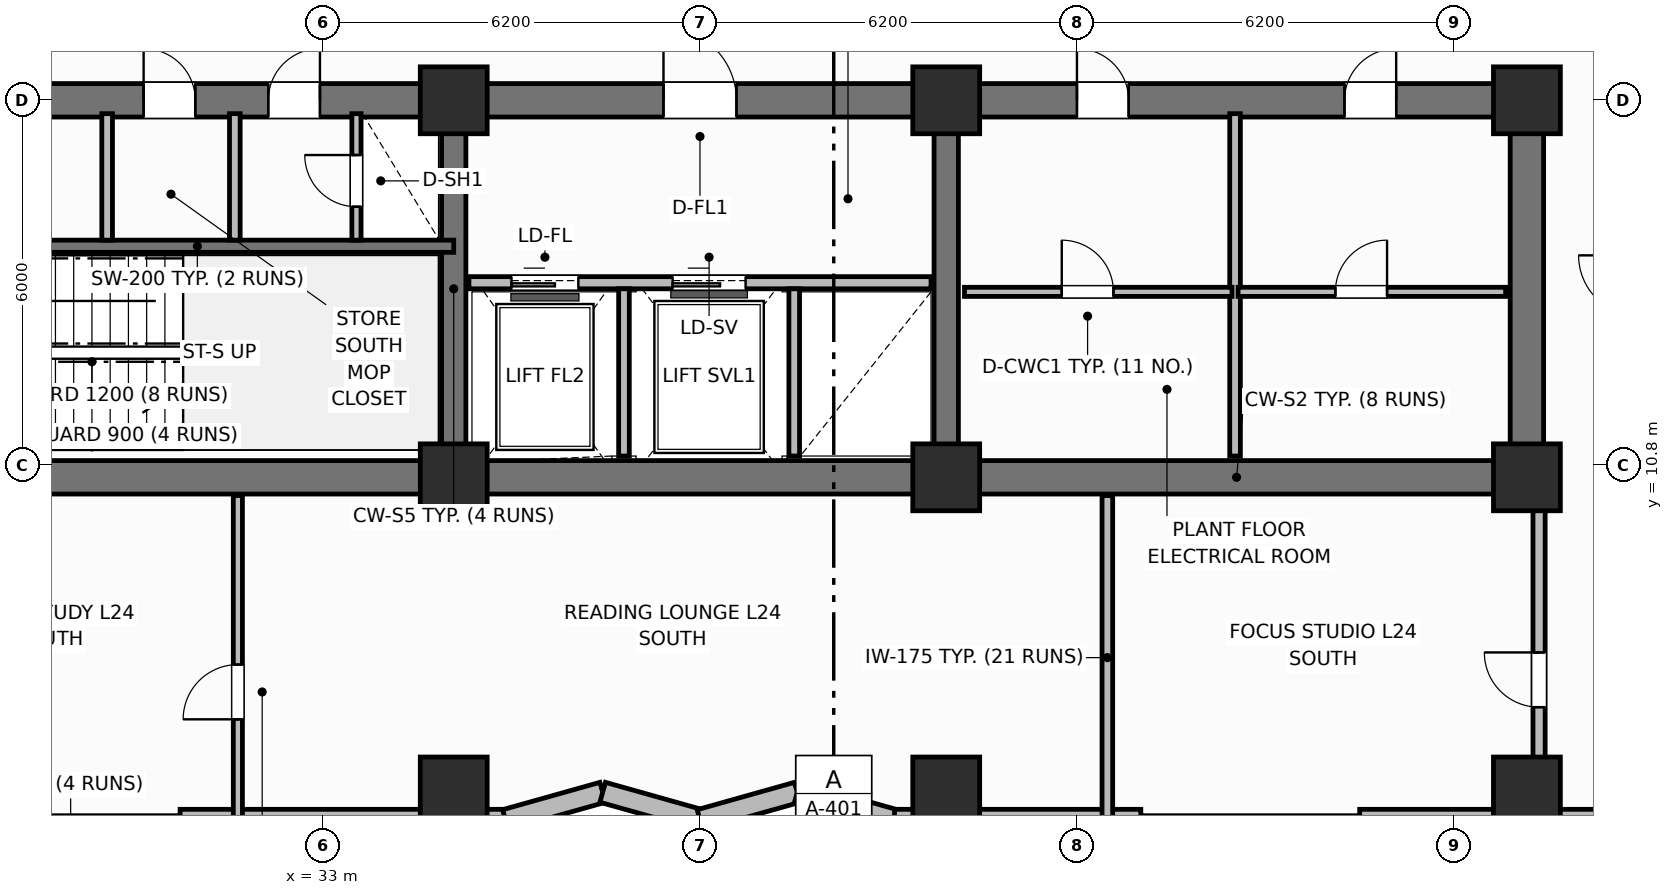
"""IFC4 building model, lengths in metres.
Left out: names, types, materials, properties, quantities, classifications, styles, units other than length and angle.
Written with IfcOpenShell. Run it as: python <this file> out.ifc"""

import sys

from ifc_helpers import new_model, si_unit, direction, frame, frame_2d, origin, origin_2d, place, context, subcontext, project, spatial, rectangle, extrude, element, fill, save


model = new_model("IFC4")
c1 = context("Model", 3, precision=1e-05, world=origin(), true_north=direction((0.0, 1.0)))
c2 = subcontext(c1, "Body", "Model", "MODEL_VIEW")
j1 = project(units=[si_unit("LENGTHUNIT", "METRE"), si_unit("PLANEANGLEUNIT", "RADIAN")], contexts=[c1])
p1 = place(None, origin())
s1 = spatial("IfcSite", under=j1, at=p1, CompositionType="ELEMENT")
p2 = place(p1, origin())
s2 = spatial("IfcBuilding", under=s1, at=p2, CompositionType="ELEMENT")
p3 = place(p2, frame((0.0, 0.0, 99.4)))
s3 = spatial("IfcBuildingStorey", under=s2, at=p3, CompositionType="ELEMENT", Elevation=99.4)
p4 = place(p3, frame((52.8, 10.6, 0.0), z_axis=(0.0, 0.0, 1.0), x_axis=(-1.0, 0.0, 0.0)))
e1 = element("IfcWall", 1, at=p4, inside=s3, PredefinedType="SHEAR", context=c2, shape_type="SweptSolid", body=[
    extrude(rectangle(XDim=27.2, YDim=0.55, at=frame_2d((13.6, 0.0))), origin(), (0.0, 0.0, 1.0), 3.7),
])
p5 = place(p3, frame((52.8, 10.875, 0.0), z_axis=(0.0, 0.0, 1.0), x_axis=(0.0, 1.0, 0.0)))
e2 = element("IfcWall", 2, at=p5, inside=s3, PredefinedType="SHEAR", context=c2, shape_type="SweptSolid", body=[
    extrude(rectangle(XDim=5.65, YDim=0.55, at=frame_2d((2.825, 0.0))), origin(), (0.0, 0.0, 1.0), 3.7),
])
p6 = place(p3, frame((25.6, 16.8, 0.0), z_axis=(0.0, 0.0, 1.0), x_axis=(1.0, 0.0, 0.0)))
e3 = element("IfcWall", 3, at=p6, inside=s3, PredefinedType="SHEAR", context=c2, shape_type="SweptSolid", body=[
    extrude(rectangle(XDim=27.2, YDim=0.55, at=frame_2d((13.6, 0.0))), origin(), (0.0, 0.0, 1.0), 3.7),
])
p7 = place(p6, frame((1.7, 0.0, 0.0)))
e4 = element("IfcOpeningElement", 4, at=p7, cuts=e3, PredefinedType="OPENING", context=c2, shape_type="SweptSolid", body=[
    extrude(rectangle(XDim=1.1, YDim=2.15, at=frame_2d((0.55, 1.075))), frame((0.0, 0.285, 0.0), z_axis=(0.0, -1.0, 0.0), x_axis=(1.0, 0.0, 0.0)), (0.0, 0.0, 1.0), 0.57),
])
p8 = place(p6, frame((4.45, 0.0, 0.0)))
e5 = element("IfcOpeningElement", 5, at=p8, cuts=e3, PredefinedType="OPENING", context=c2, shape_type="SweptSolid", body=[
    extrude(rectangle(XDim=0.85, YDim=2.1, at=frame_2d((0.425, 1.05))), frame((0.0, 0.285, 0.0), z_axis=(0.0, -1.0, 0.0), x_axis=(1.0, 0.0, 0.0)), (0.0, 0.0, 1.0), 0.57),
])
p9 = place(p6, frame((6.5, 0.0, 0.0)))
e6 = element("IfcOpeningElement", 6, at=p9, cuts=e3, PredefinedType="OPENING", context=c2, shape_type="SweptSolid", body=[
    extrude(rectangle(XDim=0.85, YDim=2.1, at=frame_2d((0.425, 1.05))), frame((0.0, 0.285, 0.0), z_axis=(0.0, -1.0, 0.0), x_axis=(1.0, 0.0, 0.0)), (0.0, 0.0, 1.0), 0.57),
])
p10 = place(p6, frame((13.0, 0.0, 0.0)))
e7 = element("IfcOpeningElement", 7, at=p10, cuts=e3, PredefinedType="OPENING", context=c2, shape_type="SweptSolid", body=[
    extrude(rectangle(XDim=1.2, YDim=2.15, at=frame_2d((0.6, 1.075))), frame((0.0, 0.285, 0.0), z_axis=(0.0, -1.0, 0.0), x_axis=(1.0, 0.0, 0.0)), (0.0, 0.0, 1.0), 0.57),
])
p11 = place(p6, frame((19.8, 0.0, 0.0)))
e8 = element("IfcOpeningElement", 8, at=p11, cuts=e3, PredefinedType="OPENING", context=c2, shape_type="SweptSolid", body=[
    extrude(rectangle(XDim=0.85, YDim=2.1, at=frame_2d((0.425, 1.05))), frame((0.0, 0.285, 0.0), z_axis=(0.0, -1.0, 0.0), x_axis=(1.0, 0.0, 0.0)), (0.0, 0.0, 1.0), 0.57),
])
p12 = place(p6, frame((24.2, 0.0, 0.0)))
e9 = element("IfcOpeningElement", 9, at=p12, cuts=e3, PredefinedType="OPENING", context=c2, shape_type="SweptSolid", body=[
    extrude(rectangle(XDim=0.85, YDim=2.1, at=frame_2d((0.425, 1.05))), frame((0.0, 0.285, 0.0), z_axis=(0.0, -1.0, 0.0), x_axis=(1.0, 0.0, 0.0)), (0.0, 0.0, 1.0), 0.57),
])
for number, where, z_axis, x_axis in (
    (10, (35.15, 10.875, 0.0), (0.0, 0.0, 1.0), (0.0, 1.0, 0.0)),
    (11, (43.25, 10.875, 0.0), (0.0, 0.0, 1.0), (0.0, 1.0, 0.0)),
):
    element("IfcWall", number, at=place(p3, frame(where, z_axis=z_axis, x_axis=x_axis)), inside=s3, PredefinedType="SHEAR", context=c2, shape_type="SweptSolid", body=[
        extrude(rectangle(XDim=5.65, YDim=0.4, at=frame_2d((2.825, 0.0))), origin(), (0.0, 0.0, 1.0), 3.7),
    ])
for number, where, z_axis, x_axis in (
    (12, (35.15, 10.6, 0.0), (0.0, 0.0, 1.0), (1.0, 0.0, 0.0)),
    (13, (35.15, 16.8, 0.0), (0.0, 0.0, 1.0), (1.0, 0.0, 0.0)),
    (14, (43.25, 10.6, 0.0), (0.0, 0.0, 1.0), (1.0, 0.0, 0.0)),
    (15, (43.25, 16.8, 0.0), (0.0, 0.0, 1.0), (1.0, 0.0, 0.0)),
    (16, (52.8, 10.6, 0.0), (0.0, 0.0, 1.0), (1.0, 0.0, 0.0)),
    (17, (52.8, 16.8, 0.0), (0.0, 0.0, 1.0), (1.0, 0.0, 0.0)),
    (18, (35.15, 5.45, 0.0), (0.0, 0.0, 1.0), (1.0, 0.0, 0.0)),
    (19, (43.25, 5.45, 0.0), (0.0, 0.0, 1.0), (1.0, 0.0, 0.0)),
    (20, (52.8, 5.45, 0.0), (0.0, 0.0, 1.0), (1.0, 0.0, 0.0)),
):
    element("IfcColumn", number, at=place(p3, frame(where, z_axis=z_axis, x_axis=x_axis)), inside=s3, PredefinedType="COLUMN", context=c2, shape_type="SweptSolid", body=[
        extrude(rectangle(XDim=1.1, YDim=1.1, at=origin_2d()), origin(), (0.0, 0.0, 1.0), 3.7),
    ])
p13 = place(p3, frame((30.65, 4.97, 0.0), z_axis=(0.0, 0.0, 1.0), x_axis=(1.0, 0.0, 0.0)))
e21 = element("IfcWall", 21, at=p13, inside=s3, PredefinedType="SOLIDWALL", context=c2, shape_type="SweptSolid", body=[
    extrude(rectangle(XDim=5.35, YDim=0.34, at=frame_2d((2.675, 0.0))), origin(), (0.0, 0.0, 1.0), 2.7),
])
p14 = place(p3, frame((36.0, 4.97, 0.0), z_axis=(0.0, 0.0, 1.0), x_axis=(0.962662902433, 0.270703040766, 0.0)))
e22 = element("IfcWall", 22, at=p14, inside=s3, PredefinedType="SOLIDWALL", context=c2, shape_type="SweptSolid", body=[
    extrude(rectangle(XDim=1.662, YDim=0.34, at=frame_2d((0.831, 0.0))), origin(), (0.0, 0.0, 1.0), 2.7),
])
p15 = place(p3, frame((37.6, 5.42, 0.0), z_axis=(0.0, 0.0, 1.0), x_axis=(0.962652136636, -0.270741322725, 0.0)))
e23 = element("IfcWall", 23, at=p15, inside=s3, PredefinedType="SOLIDWALL", context=c2, shape_type="SweptSolid", body=[
    extrude(rectangle(XDim=1.662, YDim=0.34, at=frame_2d((0.831, 0.0))), origin(), (0.0, 0.0, 1.0), 2.7),
])
p16 = place(p3, frame((39.2, 4.97, 0.0), z_axis=(0.0, 0.0, 1.0), x_axis=(0.962662902433, 0.270703040766, 0.0)))
e24 = element("IfcWall", 24, at=p16, inside=s3, PredefinedType="SOLIDWALL", context=c2, shape_type="SweptSolid", body=[
    extrude(rectangle(XDim=1.662, YDim=0.34, at=frame_2d((0.831, 0.0))), origin(), (0.0, 0.0, 1.0), 2.7),
])
p17 = place(p3, frame((40.8, 5.42, 0.0), z_axis=(0.0, 0.0, 1.0), x_axis=(0.962652136636, -0.270741322725, 0.0)))
e25 = element("IfcWall", 25, at=p17, inside=s3, PredefinedType="SOLIDWALL", context=c2, shape_type="SweptSolid", body=[
    extrude(rectangle(XDim=1.662, YDim=0.34, at=frame_2d((0.831, 0.0))), origin(), (0.0, 0.0, 1.0), 2.7),
])
p18 = place(p3, frame((42.4, 4.97, 0.0), z_axis=(0.0, 0.0, 1.0), x_axis=(1.0, 0.0, 0.0)))
e26 = element("IfcWall", 26, at=p18, inside=s3, PredefinedType="SOLIDWALL", context=c2, shape_type="SweptSolid", body=[
    extrude(rectangle(XDim=4.05, YDim=0.34, at=frame_2d((2.025, 0.0))), origin(), (0.0, 0.0, 1.0), 2.7),
])
p19 = place(p3, frame((50.05, 4.97, 0.0), z_axis=(0.0, 0.0, 1.0), x_axis=(1.0, 0.0, 0.0)))
e27 = element("IfcWall", 27, at=p19, inside=s3, PredefinedType="SOLIDWALL", context=c2, shape_type="SweptSolid", body=[
    extrude(rectangle(XDim=9.75, YDim=0.34, at=frame_2d((4.875, 0.0))), origin(), (0.0, 0.0, 1.0), 2.7),
])
p20 = place(p19, frame((5.938, 0.0, 0.68)))
e28 = element("IfcOpeningElement", 28, at=p20, cuts=e27, PredefinedType="OPENING", context=c2, shape_type="SweptSolid", body=[
    extrude(rectangle(XDim=2.1, YDim=1.9, at=frame_2d((1.05, 0.95))), frame((0.0, 0.18, 0.0), z_axis=(0.0, -1.0, 0.0), x_axis=(1.0, 0.0, 0.0)), (0.0, 0.0, 1.0), 0.36),
])
p21 = place(p3, frame((25.6, 14.4, 0.0), z_axis=(0.0, 0.0, 1.0), x_axis=(1.0, 0.0, 0.0)))
e29 = element("IfcWall", 29, at=p21, inside=s3, PredefinedType="SHEAR", context=c2, shape_type="SweptSolid", body=[
    extrude(rectangle(XDim=9.55, YDim=0.2, at=frame_2d((4.775, 0.0))), origin(), (0.0, 0.0, 1.0), 3.7),
])
p22 = place(p21, frame((1.05, 0.0, 0.0)))
e30 = element("IfcOpeningElement", 30, at=p22, cuts=e29, PredefinedType="OPENING", context=c2, shape_type="SweptSolid", body=[
    extrude(rectangle(XDim=1.1, YDim=2.15, at=frame_2d((0.55, 1.075))), frame((0.0, 0.11, 0.0), z_axis=(0.0, -1.0, 0.0), x_axis=(1.0, 0.0, 0.0)), (0.0, 0.0, 1.0), 0.22),
])
for number, where, z_axis, x_axis in (
    (31, (29.45, 14.5, 0.0), (0.0, 0.0, 1.0), (0.0, 1.0, 0.0)),
    (32, (31.55, 14.5, 0.0), (0.0, 0.0, 1.0), (0.0, 1.0, 0.0)),
):
    element("IfcWall", number, at=place(p3, frame(where, z_axis=z_axis, x_axis=x_axis)), inside=s3, PredefinedType="PARTITIONING", context=c2, shape_type="SweptSolid", body=[
        extrude(rectangle(XDim=2.08, YDim=0.175, at=frame_2d((1.04, 0.0))), origin(), (0.0, 0.0, 1.0), 2.53),
    ])
p23 = place(p3, frame((33.55, 14.5, 0.0), z_axis=(0.0, 0.0, 1.0), x_axis=(0.0, 1.0, 0.0)))
e33 = element("IfcWall", 33, at=p23, inside=s3, PredefinedType="PARTITIONING", context=c2, shape_type="SweptSolid", body=[
    extrude(rectangle(XDim=2.08, YDim=0.15, at=frame_2d((1.04, 0.0))), origin(), (0.0, 0.0, 1.0), 2.53),
])
p24 = place(p23, frame((0.55, 0.0, 0.0)))
e34 = element("IfcOpeningElement", 34, at=p24, cuts=e33, PredefinedType="OPENING", context=c2, shape_type="SweptSolid", body=[
    extrude(rectangle(XDim=0.85, YDim=2.05, at=frame_2d((0.425, 1.025))), frame((0.0, 0.085, 0.0), z_axis=(0.0, -1.0, 0.0), x_axis=(1.0, 0.0, 0.0)), (0.0, 0.0, 1.0), 0.17),
])
p25 = place(p3, frame((35.4, 13.8, 0.0), z_axis=(0.0, 0.0, 1.0), x_axis=(1.0, 0.0, 0.0)))
e35 = element("IfcWall", 35, at=p25, inside=s3, PredefinedType="PARTITIONING", context=c2, shape_type="SweptSolid", body=[
    extrude(rectangle(XDim=7.6, YDim=0.2, at=frame_2d((3.8, 0.0))), origin(), (0.0, 0.0, 1.0), 2.3),
])
p26 = place(p25, frame((0.7, 0.0, 0.0)))
e36 = element("IfcOpeningElement", 36, at=p26, cuts=e35, PredefinedType="OPENING", context=c2, shape_type="SweptSolid", body=[
    extrude(rectangle(XDim=1.1, YDim=2.15, at=frame_2d((0.55, 1.075))), frame((0.0, 0.11, 0.0), z_axis=(0.0, -1.0, 0.0), x_axis=(1.0, 0.0, 0.0)), (0.0, 0.0, 1.0), 0.22),
])
p27 = place(p25, frame((3.35, 0.0, 0.0)))
e37 = element("IfcOpeningElement", 37, at=p27, cuts=e35, PredefinedType="OPENING", context=c2, shape_type="SweptSolid", body=[
    extrude(rectangle(XDim=1.2, YDim=2.15, at=frame_2d((0.6, 1.075))), frame((0.0, 0.11, 0.0), z_axis=(0.0, -1.0, 0.0), x_axis=(1.0, 0.0, 0.0)), (0.0, 0.0, 1.0), 0.22),
])
for number, where, z_axis, x_axis in (
    (38, (37.95, 10.95, 0.0), (0.0, 0.0, 1.0), (0.0, 1.0, 0.0)),
    (39, (40.75, 10.95, 0.0), (0.0, 0.0, 1.0), (0.0, 1.0, 0.0)),
):
    element("IfcWall", number, at=place(p3, frame(where, z_axis=z_axis, x_axis=x_axis)), inside=s3, PredefinedType="PARTITIONING", context=c2, shape_type="SweptSolid", body=[
        extrude(rectangle(XDim=2.75, YDim=0.175, at=frame_2d((1.375, 0.0))), origin(), (0.0, 0.0, 1.0), 2.53),
    ])
p28 = place(p3, frame((48.0, 10.95, 0.0), z_axis=(0.0, 0.0, 1.0), x_axis=(0.0, 1.0, 0.0)))
e40 = element("IfcWall", 40, at=p28, inside=s3, PredefinedType="PARTITIONING", context=c2, shape_type="SweptSolid", body=[
    extrude(rectangle(XDim=5.63, YDim=0.175, at=frame_2d((2.815, 0.0))), origin(), (0.0, 0.0, 1.0), 2.53),
])
p29 = place(p3, frame((43.55, 13.65, 0.0), z_axis=(0.0, 0.0, 1.0), x_axis=(1.0, 0.0, 0.0)))
e41 = element("IfcWall", 41, at=p29, inside=s3, PredefinedType="PARTITIONING", context=c2, shape_type="SweptSolid", body=[
    extrude(rectangle(XDim=4.4, YDim=0.15, at=frame_2d((2.2, 0.0))), origin(), (0.0, 0.0, 1.0), 2.53),
])
p30 = place(p29, frame((1.6, 0.0, 0.0)))
e42 = element("IfcOpeningElement", 42, at=p30, cuts=e41, PredefinedType="OPENING", context=c2, shape_type="SweptSolid", body=[
    extrude(rectangle(XDim=0.85, YDim=2.1, at=frame_2d((0.425, 1.05))), frame((0.0, 0.085, 0.0), z_axis=(0.0, -1.0, 0.0), x_axis=(1.0, 0.0, 0.0)), (0.0, 0.0, 1.0), 0.17),
])
p31 = place(p3, frame((48.05, 13.65, 0.0), z_axis=(0.0, 0.0, 1.0), x_axis=(1.0, 0.0, 0.0)))
e43 = element("IfcWall", 43, at=p31, inside=s3, PredefinedType="PARTITIONING", context=c2, shape_type="SweptSolid", body=[
    extrude(rectangle(XDim=4.4, YDim=0.15, at=frame_2d((2.2, 0.0))), origin(), (0.0, 0.0, 1.0), 2.53),
])
p32 = place(p31, frame((1.6, 0.0, 0.0)))
e44 = element("IfcOpeningElement", 44, at=p32, cuts=e43, PredefinedType="OPENING", context=c2, shape_type="SweptSolid", body=[
    extrude(rectangle(XDim=0.85, YDim=2.1, at=frame_2d((0.425, 1.05))), frame((0.0, 0.085, 0.0), z_axis=(0.0, -1.0, 0.0), x_axis=(1.0, 0.0, 0.0)), (0.0, 0.0, 1.0), 0.17),
])
p33 = place(p3, frame((31.6, 4.97, 0.0), z_axis=(0.0, 0.0, 1.0), x_axis=(0.0, 1.0, 0.0)))
e45 = element("IfcWall", 45, at=p33, inside=s3, PredefinedType="PARTITIONING", context=c2, shape_type="SweptSolid", body=[
    extrude(rectangle(XDim=5.33, YDim=0.15, at=frame_2d((2.665, 0.0))), origin(), (0.0, 0.0, 1.0), 2.53),
])
p34 = place(p33, frame((1.65, 0.0, 0.0)))
e46 = element("IfcOpeningElement", 46, at=p34, cuts=e45, PredefinedType="OPENING", context=c2, shape_type="SweptSolid", body=[
    extrude(rectangle(XDim=0.9, YDim=2.1, at=frame_2d((0.45, 1.05))), frame((0.0, 0.085, 0.0), z_axis=(0.0, -1.0, 0.0), x_axis=(1.0, 0.0, 0.0)), (0.0, 0.0, 1.0), 0.17),
])
p35 = place(p3, frame((45.9, 4.97, 0.0), z_axis=(0.0, 0.0, 1.0), x_axis=(0.0, 1.0, 0.0)))
e47 = element("IfcWall", 47, at=p35, inside=s3, PredefinedType="PARTITIONING", context=c2, shape_type="SweptSolid", body=[
    extrude(rectangle(XDim=5.33, YDim=0.175, at=frame_2d((2.665, 0.0))), origin(), (0.0, 0.0, 1.0), 2.53),
])
p36 = place(p3, frame((53.0, 5.97, 0.0), z_axis=(0.0, 0.0, 1.0), x_axis=(0.0, 1.0, 0.0)))
e48 = element("IfcWall", 48, at=p36, inside=s3, PredefinedType="PARTITIONING", context=c2, shape_type="SweptSolid", body=[
    extrude(rectangle(XDim=4.33, YDim=0.2, at=frame_2d((2.165, 0.0))), origin(), (0.0, 0.0, 1.0), 2.53),
])
p37 = place(p36, frame((0.85, 0.0, 0.0)))
e49 = element("IfcOpeningElement", 49, at=p37, cuts=e48, PredefinedType="OPENING", context=c2, shape_type="SweptSolid", body=[
    extrude(rectangle(XDim=0.9, YDim=2.1, at=frame_2d((0.45, 1.05))), frame((0.0, 0.11, 0.0), z_axis=(0.0, -1.0, 0.0), x_axis=(1.0, 0.0, 0.0)), (0.0, 0.0, 1.0), 0.22),
])
p38 = place(p24, origin())
e50 = element("IfcDoor", 50, at=p38, inside=s3, OperationType="SINGLE_SWING_RIGHT", PredefinedType="TRAPDOOR", context=c2, shape_type="SweptSolid", body=[
    extrude(rectangle(XDim=0.85, YDim=2.05, at=frame_2d((0.425, 1.025))), frame((0.0, 0.025, 0.0), z_axis=(0.0, -1.0, 0.0), x_axis=(1.0, 0.0, 0.0)), (0.0, 0.0, 1.0), 0.05),
])
fill(e34, e50)
p39 = place(p26, origin())
e51 = element("IfcDoor", 51, at=p39, inside=s3, OperationType="SLIDING_TO_LEFT", PredefinedType="DOOR", context=c2, shape_type="SweptSolid", body=[
    extrude(rectangle(XDim=1.1, YDim=2.15, at=frame_2d((0.55, 1.075))), frame((0.0, 0.025, 0.0), z_axis=(0.0, -1.0, 0.0), x_axis=(1.0, 0.0, 0.0)), (0.0, 0.0, 1.0), 0.05),
])
fill(e36, e51)
p40 = place(p27, origin())
e52 = element("IfcDoor", 52, at=p40, inside=s3, OperationType="SLIDING_TO_LEFT", PredefinedType="DOOR", context=c2, shape_type="SweptSolid", body=[
    extrude(rectangle(XDim=1.2, YDim=2.15, at=frame_2d((0.6, 1.075))), frame((0.0, 0.025, 0.0), z_axis=(0.0, -1.0, 0.0), x_axis=(1.0, 0.0, 0.0)), (0.0, 0.0, 1.0), 0.05),
])
fill(e37, e52)
p41 = place(p30, origin())
e53 = element("IfcDoor", 53, at=p41, inside=s3, OperationType="SINGLE_SWING_LEFT", PredefinedType="DOOR", context=c2, shape_type="SweptSolid", body=[
    extrude(rectangle(XDim=0.85, YDim=2.1, at=frame_2d((0.425, 1.05))), frame((0.0, 0.025, 0.0), z_axis=(0.0, -1.0, 0.0), x_axis=(1.0, 0.0, 0.0)), (0.0, 0.0, 1.0), 0.05),
])
fill(e42, e53)
p42 = place(p32, origin())
e54 = element("IfcDoor", 54, at=p42, inside=s3, OperationType="SINGLE_SWING_RIGHT", PredefinedType="DOOR", context=c2, shape_type="SweptSolid", body=[
    extrude(rectangle(XDim=0.85, YDim=2.1, at=frame_2d((0.425, 1.05))), frame((0.0, 0.025, 0.0), z_axis=(0.0, -1.0, 0.0), x_axis=(1.0, 0.0, 0.0)), (0.0, 0.0, 1.0), 0.05),
])
fill(e44, e54)
p43 = place(p34, origin())
e55 = element("IfcDoor", 55, at=p43, inside=s3, OperationType="SINGLE_SWING_LEFT", PredefinedType="DOOR", context=c2, shape_type="SweptSolid", body=[
    extrude(rectangle(XDim=0.9, YDim=2.1, at=frame_2d((0.45, 1.05))), frame((0.0, 0.025, 0.0), z_axis=(0.0, -1.0, 0.0), x_axis=(1.0, 0.0, 0.0)), (0.0, 0.0, 1.0), 0.05),
])
fill(e46, e55)
p44 = place(p37, origin())
e56 = element("IfcDoor", 56, at=p44, inside=s3, OperationType="SINGLE_SWING_RIGHT", PredefinedType="DOOR", context=c2, shape_type="SweptSolid", body=[
    extrude(rectangle(XDim=0.9, YDim=2.1, at=frame_2d((0.45, 1.05))), frame((0.0, 0.025, 0.0), z_axis=(0.0, -1.0, 0.0), x_axis=(1.0, 0.0, 0.0)), (0.0, 0.0, 1.0), 0.05),
])
fill(e49, e56)
p45 = place(p8, origin())
e57 = element("IfcDoor", 57, at=p45, inside=s3, OperationType="SINGLE_SWING_LEFT", PredefinedType="DOOR", context=c2, shape_type="SweptSolid", body=[
    extrude(rectangle(XDim=0.85, YDim=2.1, at=frame_2d((0.425, 1.05))), frame((0.0, 0.025, 0.0), z_axis=(0.0, -1.0, 0.0), x_axis=(1.0, 0.0, 0.0)), (0.0, 0.0, 1.0), 0.05),
])
fill(e5, e57)
p46 = place(p9, origin())
e58 = element("IfcDoor", 58, at=p46, inside=s3, OperationType="SINGLE_SWING_RIGHT", PredefinedType="DOOR", context=c2, shape_type="SweptSolid", body=[
    extrude(rectangle(XDim=0.85, YDim=2.1, at=frame_2d((0.425, 1.05))), frame((0.0, 0.025, 0.0), z_axis=(0.0, -1.0, 0.0), x_axis=(1.0, 0.0, 0.0)), (0.0, 0.0, 1.0), 0.05),
])
fill(e6, e58)
p47 = place(p10, origin())
e59 = element("IfcDoor", 59, at=p47, inside=s3, OperationType="SINGLE_SWING_LEFT", PredefinedType="DOOR", context=c2, shape_type="SweptSolid", body=[
    extrude(rectangle(XDim=1.2, YDim=2.15, at=frame_2d((0.6, 1.075))), frame((0.0, 0.025, 0.0), z_axis=(0.0, -1.0, 0.0), x_axis=(1.0, 0.0, 0.0)), (0.0, 0.0, 1.0), 0.05),
])
fill(e7, e59)
p48 = place(p11, origin())
e60 = element("IfcDoor", 60, at=p48, inside=s3, OperationType="SINGLE_SWING_LEFT", PredefinedType="DOOR", context=c2, shape_type="SweptSolid", body=[
    extrude(rectangle(XDim=0.85, YDim=2.1, at=frame_2d((0.425, 1.05))), frame((0.0, 0.025, 0.0), z_axis=(0.0, -1.0, 0.0), x_axis=(1.0, 0.0, 0.0)), (0.0, 0.0, 1.0), 0.05),
])
fill(e8, e60)
p49 = place(p12, origin())
e61 = element("IfcDoor", 61, at=p49, inside=s3, OperationType="SINGLE_SWING_RIGHT", PredefinedType="DOOR", context=c2, shape_type="SweptSolid", body=[
    extrude(rectangle(XDim=0.85, YDim=2.1, at=frame_2d((0.425, 1.05))), frame((0.0, 0.025, 0.0), z_axis=(0.0, -1.0, 0.0), x_axis=(1.0, 0.0, 0.0)), (0.0, 0.0, 1.0), 0.05),
])
fill(e9, e61)
save(model, sys.argv[1])
